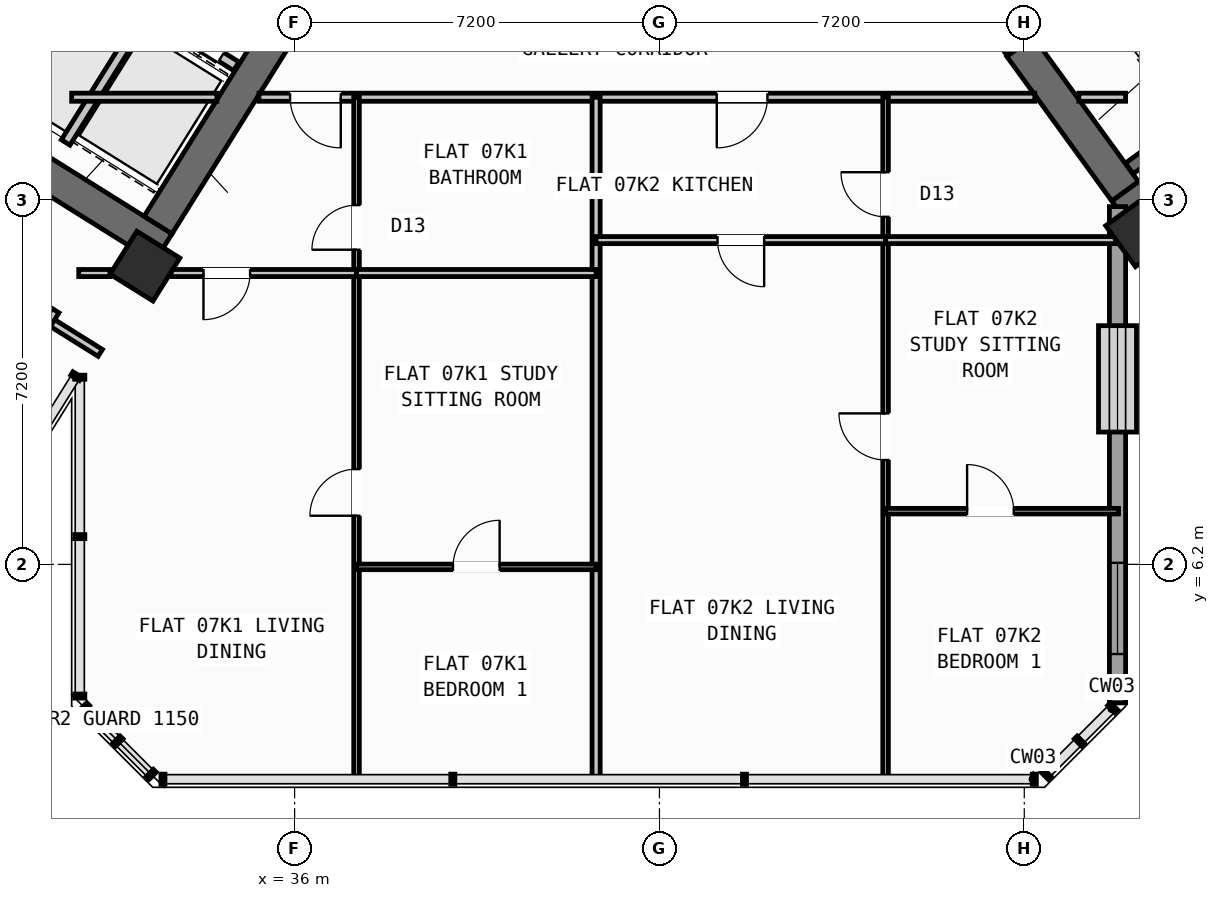
"""IFC4 building model, lengths in metres.
Left out: names, types, materials, properties, quantities, classifications, styles, units other than length and angle.
Written with IfcOpenShell. Run it as: python <this file> out.ifc"""

import sys

from ifc_helpers import new_model, si_unit, direction, frame, frame_2d, origin, origin_2d, place, context, subcontext, project, spatial, rectangle, hollow_rectangle, extrude, source, transform, mapped, element, fill, save


model = new_model("IFC4")
c1 = context("Model", 3, precision=1e-05, world=origin(), true_north=direction((0.0, 1.0)))
c2 = subcontext(c1, "Body", "Model", "MODEL_VIEW")
j1 = project(units=[si_unit("LENGTHUNIT", "METRE"), si_unit("PLANEANGLEUNIT", "RADIAN")], contexts=[c1])
p1 = place(None, origin())
s1 = spatial("IfcSite", under=j1, at=p1, CompositionType="ELEMENT")
p2 = place(p1, origin())
s2 = spatial("IfcBuilding", under=s1, at=p2, CompositionType="ELEMENT")
p3 = place(p2, frame((0.0, 0.0, 31.2)))
s3 = spatial("IfcBuildingStorey", under=s2, at=p3, CompositionType="ELEMENT", Elevation=31.2)
p4 = place(p3, frame((33.409, 12.45, 0.0), z_axis=(0.0, 0.0, 1.0), x_axis=(-0.848051132073, 0.529914405721, 0.0)))
e1 = element("IfcWall", 1, at=p4, inside=s3, PredefinedType="SHEAR", context=c2, shape_type="SweptSolid", body=[
    extrude(rectangle(XDim=13.24, YDim=0.65, at=frame_2d((6.62, 0.0))), origin(), (0.0, 0.0, 1.0), 3.35),
])
p5 = place(p3, frame((36.683, 18.304, 0.0), z_axis=(0.0, 0.0, 1.0), x_axis=(-0.529899109053, -0.848060690178, 0.0)))
e2 = element("IfcWall", 2, at=p5, inside=s3, PredefinedType="SHEAR", context=c2, shape_type="SweptSolid", body=[
    extrude(rectangle(XDim=6.375, YDim=0.65, at=frame_2d((3.188, 0.0))), origin(), (0.0, 0.0, 1.0), 3.35),
])
p6 = place(p3, frame((52.318, 13.11, 0.0), z_axis=(0.0, 0.0, 1.0), x_axis=(0.809019445368, 0.587781878776, 0.0)))
e3 = element("IfcWall", 3, at=p6, inside=s3, PredefinedType="SHEAR", context=c2, shape_type="SweptSolid", body=[
    extrude(rectangle(XDim=12.44, YDim=0.65, at=frame_2d((6.22, 0.0))), origin(), (0.0, 0.0, 1.0), 3.35),
])
p7 = place(p3, frame((52.39, 13.564, 0.0), z_axis=(0.0, 0.0, 1.0), x_axis=(-0.58779688989, 0.809008539037, 0.0)))
e4 = element("IfcWall", 4, at=p7, inside=s3, PredefinedType="SHEAR", context=c2, shape_type="SweptSolid", body=[
    extrude(rectangle(XDim=3.525, YDim=0.65, at=frame_2d((1.763, 0.0))), origin(), (0.0, 0.0, 1.0), 3.35),
])
m1 = source(origin(), c2, "Body", "SweptSolid", [
    extrude(hollow_rectangle(XDim=1.0, YDim=1.0, WallThickness=0.04, at=origin_2d()), origin(), (0.0, 0.0, 1.0), 3.6),
])
for number, where, z_axis, x_axis in (
    (5, (33.046, 12.087, 0.0), (0.0, 0.0, 1.0), (-0.848, 0.53, 0.0)),
    (6, (52.705, 12.773, 0.0), (0.0, 0.0, 1.0), (0.809, 0.588, 0.0)),
):
    element("IfcColumn", number, at=place(p3, frame(where, z_axis=z_axis, x_axis=x_axis)), inside=s3, PredefinedType="COLUMN", context=c2, shape_type="MappedRepresentation", body=[
        mapped(m1, transform((0.0, 0.0, 0.0), scale=1.0)),
    ])
p8 = place(p3, frame((56.581, 7.439, 0.0), z_axis=(0.0, 0.0, 1.0), x_axis=(-0.587785875463, 0.809016541614, 0.0)))
e7 = element("IfcWall", 7, at=p8, inside=s3, PredefinedType="STANDARD", context=c2, shape_type="SweptSolid", body=[
    extrude(rectangle(XDim=6.774, YDim=0.32, at=frame_2d((3.387, 0.0))), origin(), (0.0, 0.0, 1.0), 2.725),
])
p9 = place(p8, frame((1.556, 0.0, 0.8)))
e8 = element("IfcOpeningElement", 8, at=p9, cuts=e7, PredefinedType="OPENING", context=c2, shape_type="SweptSolid", body=[
    extrude(rectangle(XDim=2.1, YDim=1.55, at=frame_2d((1.05, 0.775))), frame((0.0, 0.17, 0.0), z_axis=(0.0, -1.0, 0.0), x_axis=(1.0, 0.0, 0.0)), (0.0, 0.0, 1.0), 0.34),
])
p10 = place(p3, frame((52.24, 13.261, 0.0), z_axis=(0.0, 0.0, 1.0), x_axis=(0.0, -1.0, 0.0)))
e9 = element("IfcWall", 9, at=p10, inside=s3, PredefinedType="STANDARD", context=c2, shape_type="SweptSolid", body=[
    extrude(rectangle(XDim=9.795, YDim=0.32, at=frame_2d((4.897, 0.0))), origin(), (0.0, 0.0, 1.0), 3.35),
])
p11 = place(p10, frame((2.349, 0.0, 0.8)))
e10 = element("IfcOpeningElement", 10, at=p11, cuts=e9, PredefinedType="OPENING", context=c2, shape_type="SweptSolid", body=[
    extrude(rectangle(XDim=2.1, YDim=1.55, at=frame_2d((1.05, 0.775))), frame((0.0, 0.17, 0.0), z_axis=(0.0, -1.0, 0.0), x_axis=(1.0, 0.0, 0.0)), (0.0, 0.0, 1.0), 0.34),
])
p12 = place(p10, frame((7.03, 0.0, 0.85)))
e11 = element("IfcOpeningElement", 11, at=p12, cuts=e9, PredefinedType="OPENING", context=c2, shape_type="SweptSolid", body=[
    extrude(rectangle(XDim=1.8, YDim=1.5, at=frame_2d((0.9, 0.75))), frame((0.0, 0.17, 0.0), z_axis=(0.0, -1.0, 0.0), x_axis=(1.0, 0.0, 0.0)), (0.0, 0.0, 1.0), 0.34),
])
p13 = place(p3, frame((31.288, 18.256, 0.0), z_axis=(0.0, 0.0, 1.0), x_axis=(-0.529943379326, -0.848033026897, 0.0)))
e12 = element("IfcWall", 12, at=p13, inside=s3, PredefinedType="SHEAR", context=c2, shape_type="SweptSolid", body=[
    extrude(rectangle(XDim=3.16, YDim=0.26, at=frame_2d((1.58, 0.0))), origin(), (0.0, 0.0, 1.0), 3.35),
])
p14 = place(p3, frame((34.848, 16.031, 0.0), z_axis=(0.0, 0.0, 1.0), x_axis=(-0.848044042236, 0.529925751807, 0.0)))
e13 = element("IfcWall", 13, at=p14, inside=s3, PredefinedType="STANDARD", context=c2, shape_type="SweptSolid", body=[
    extrude(rectangle(XDim=4.198, YDim=0.2, at=frame_2d((2.099, 0.0))), origin(), (0.0, 0.0, 1.0), 3.34),
])
p15 = place(p14, frame((0.348, 0.0, 0.0)))
e14 = element("IfcOpeningElement", 14, at=p15, cuts=e13, PredefinedType="OPENING", context=c2, shape_type="SweptSolid", body=[
    extrude(rectangle(XDim=1.3, YDim=2.2, at=frame_2d((0.65, 1.1))), frame((0.0, 0.11, 0.0), z_axis=(0.0, -1.0, 0.0), x_axis=(1.0, 0.0, 0.0)), (0.0, 0.0, 1.0), 0.22),
])
p16 = place(p14, frame((2.423, 0.0, 0.0)))
e15 = element("IfcOpeningElement", 15, at=p16, cuts=e13, PredefinedType="OPENING", context=c2, shape_type="SweptSolid", body=[
    extrude(rectangle(XDim=1.45, YDim=2.25, at=frame_2d((0.725, 1.125))), frame((0.0, 0.11, 0.0), z_axis=(0.0, -1.0, 0.0), x_axis=(1.0, 0.0, 0.0)), (0.0, 0.0, 1.0), 0.22),
])
p17 = place(p3, frame((33.029, 17.003, 0.0), z_axis=(0.0, 0.0, 1.0), x_axis=(-0.529916267533, -0.848049968695, 0.0)))
e16 = element("IfcWall", 16, at=p17, inside=s3, PredefinedType="STANDARD", context=c2, shape_type="SweptSolid", body=[
    extrude(rectangle(XDim=2.92, YDim=0.2, at=frame_2d((1.46, 0.0))), origin(), (0.0, 0.0, 1.0), 3.34),
])
p18 = place(p3, frame((52.472, 14.013, 0.0), z_axis=(0.0, 0.0, 1.0), x_axis=(0.809028366311, 0.587769599847, 0.0)))
e17 = element("IfcWall", 17, at=p18, inside=s3, PredefinedType="SHEAR", context=c2, shape_type="SweptSolid", body=[
    extrude(rectangle(XDim=7.33, YDim=0.26, at=frame_2d((3.665, 0.0))), origin(), (0.0, 0.0, 1.0), 3.35),
])
p19 = place(p3, frame((32.164, 10.374, 0.0), z_axis=(0.0, 0.0, 1.0), x_axis=(-0.848044107957, 0.529925646633, 0.0)))
e18 = element("IfcWall", 18, at=p19, inside=s3, PredefinedType="PARTITIONING", context=c2, shape_type="SweptSolid", body=[
    extrude(rectangle(XDim=15.57, YDim=0.16, at=frame_2d((7.785, 0.0))), origin(), (0.0, 0.0, 1.0), 3.34),
])
p20 = place(p19, frame((10.83, 0.0, 0.0)))
e19 = element("IfcOpeningElement", 19, at=p20, cuts=e18, PredefinedType="OPENING", context=c2, shape_type="SweptSolid", body=[
    extrude(rectangle(XDim=1.0, YDim=2.1, at=frame_2d((0.5, 1.05))), frame((0.0, 0.09, 0.0), z_axis=(0.0, -1.0, 0.0), x_axis=(1.0, 0.0, 0.0)), (0.0, 0.0, 1.0), 0.18),
])
p21 = place(p3, frame((31.282, 11.208, 0.0), z_axis=(0.0, 0.0, 1.0), x_axis=(-0.529938869374, -0.84803584519, 0.0)))
e20 = element("IfcWall", 20, at=p21, inside=s3, PredefinedType="PARTITIONING", context=c2, shape_type="SweptSolid", body=[
    extrude(rectangle(XDim=5.48, YDim=0.16, at=frame_2d((2.74, 0.0))), origin(), (0.0, 0.0, 1.0), 3.34),
])
p22 = place(p3, frame((31.6, 15.42, 0.0), z_axis=(0.0, 0.0, 1.0), x_axis=(1.0, 0.0, 0.0)))
e21 = element("IfcWall", 21, at=p22, inside=s3, PredefinedType="PARTITIONING", context=c2, shape_type="SweptSolid", body=[
    extrude(rectangle(XDim=2.866, YDim=0.16, at=frame_2d((1.433, 0.0))), origin(), (0.0, 0.0, 1.0), 3.34),
])
p23 = place(p3, frame((35.296, 15.42, 0.0), z_axis=(0.0, 0.0, 1.0), x_axis=(1.0, 0.0, 0.0)))
e22 = element("IfcWall", 22, at=p23, inside=s3, PredefinedType="PARTITIONING", context=c2, shape_type="SweptSolid", body=[
    extrude(rectangle(XDim=15.311, YDim=0.16, at=frame_2d((7.655, 0.0))), origin(), (0.0, 0.0, 1.0), 3.34),
])
p24 = place(p23, frame((0.615, 0.0, 0.0)))
e23 = element("IfcOpeningElement", 23, at=p24, cuts=e22, PredefinedType="OPENING", context=c2, shape_type="SweptSolid", body=[
    extrude(rectangle(XDim=1.0, YDim=2.1, at=frame_2d((0.5, 1.05))), frame((0.0, 0.09, 0.0), z_axis=(0.0, -1.0, 0.0), x_axis=(1.0, 0.0, 0.0)), (0.0, 0.0, 1.0), 0.18),
])
p25 = place(p23, frame((9.035, 0.0, 0.0)))
e24 = element("IfcOpeningElement", 24, at=p25, cuts=e22, PredefinedType="OPENING", context=c2, shape_type="SweptSolid", body=[
    extrude(rectangle(XDim=1.0, YDim=2.1, at=frame_2d((0.5, 1.05))), frame((0.0, 0.09, 0.0), z_axis=(0.0, -1.0, 0.0), x_axis=(1.0, 0.0, 0.0)), (0.0, 0.0, 1.0), 0.18),
])
p26 = place(p3, frame((51.477, 15.42, 0.0), z_axis=(0.0, 0.0, 1.0), x_axis=(1.0, 0.0, 0.0)))
e25 = element("IfcWall", 25, at=p26, inside=s3, PredefinedType="PARTITIONING", context=c2, shape_type="SweptSolid", body=[
    extrude(rectangle(XDim=0.923, YDim=0.16, at=frame_2d((0.461, 0.0))), origin(), (0.0, 0.0, 1.0), 3.34),
])
p27 = place(p3, frame((50.119, 16.333, 0.0), z_axis=(0.0, 0.0, 1.0), x_axis=(-0.587749856981, 0.809042709391, 0.0)))
e26 = element("IfcWall", 26, at=p27, inside=s3, PredefinedType="STANDARD", context=c2, shape_type="SweptSolid", body=[
    extrude(rectangle(XDim=2.96, YDim=0.2, at=frame_2d((1.48, 0.0))), origin(), (0.0, 0.0, 1.0), 3.34),
])
p28 = place(p27, frame((0.53, 0.0, 0.0)))
e27 = element("IfcOpeningElement", 27, at=p28, cuts=e26, PredefinedType="OPENING", context=c2, shape_type="SweptSolid", body=[
    extrude(rectangle(XDim=1.5, YDim=2.15, at=frame_2d((0.75, 1.075))), frame((0.0, 0.11, 0.0), z_axis=(0.0, -1.0, 0.0), x_axis=(1.0, 0.0, 0.0)), (0.0, 0.0, 1.0), 0.22),
])
p29 = place(p3, frame((41.95, 1.96, 0.0), z_axis=(0.0, 0.0, 1.0), x_axis=(0.0, 1.0, 0.0)))
e28 = element("IfcWall", 28, at=p29, inside=s3, PredefinedType="PARTITIONING", context=c2, shape_type="SweptSolid", body=[
    extrude(rectangle(XDim=13.46, YDim=0.16, at=frame_2d((6.73, 0.0))), origin(), (0.0, 0.0, 1.0), 3.34),
])
p30 = place(p3, frame((37.222, 1.96, 0.0), z_axis=(0.0, 0.0, 1.0), x_axis=(0.0, 1.0, 0.0)))
e29 = element("IfcWall", 29, at=p30, inside=s3, PredefinedType="PARTITIONING", context=c2, shape_type="SweptSolid", body=[
    extrude(rectangle(XDim=13.46, YDim=0.11, at=frame_2d((6.73, 0.0))), origin(), (0.0, 0.0, 1.0), 3.34),
])
p31 = place(p30, frame((5.2, 0.0, 0.0)))
e30 = element("IfcOpeningElement", 30, at=p31, cuts=e29, PredefinedType="OPENING", context=c2, shape_type="SweptSolid", body=[
    extrude(rectangle(XDim=0.92, YDim=2.08, at=frame_2d((0.46, 1.04))), frame((0.0, 0.065, 0.0), z_axis=(0.0, -1.0, 0.0), x_axis=(1.0, 0.0, 0.0)), (0.0, 0.0, 1.0), 0.13),
])
p32 = place(p30, frame((10.45, 0.0, 0.0)))
e31 = element("IfcOpeningElement", 31, at=p32, cuts=e29, PredefinedType="OPENING", context=c2, shape_type="SweptSolid", body=[
    extrude(rectangle(XDim=0.88, YDim=2.08, at=frame_2d((0.44, 1.04))), frame((0.0, 0.065, 0.0), z_axis=(0.0, -1.0, 0.0), x_axis=(1.0, 0.0, 0.0)), (0.0, 0.0, 1.0), 0.13),
])
p33 = place(p3, frame((31.74, 11.95, 0.0), z_axis=(0.0, 0.0, 1.0), x_axis=(1.0, 0.0, 0.0)))
e32 = element("IfcWall", 32, at=p33, inside=s3, PredefinedType="PLUMBINGWALL", context=c2, shape_type="SweptSolid", body=[
    extrude(rectangle(XDim=0.617, YDim=0.14, at=frame_2d((0.309, 0.0))), origin(), (0.0, 0.0, 1.0), 3.34),
])
p34 = place(p3, frame((33.564, 11.95, 0.0), z_axis=(0.0, 0.0, 1.0), x_axis=(1.0, 0.0, 0.0)))
e33 = element("IfcWall", 33, at=p34, inside=s3, PredefinedType="PLUMBINGWALL", context=c2, shape_type="SweptSolid", body=[
    extrude(rectangle(XDim=3.657, YDim=0.14, at=frame_2d((1.829, 0.0))), origin(), (0.0, 0.0, 1.0), 2.525),
])
p35 = place(p34, frame((0.637, 0.0, 0.0)))
e34 = element("IfcOpeningElement", 34, at=p35, cuts=e33, PredefinedType="OPENING", context=c2, shape_type="SweptSolid", body=[
    extrude(rectangle(XDim=0.92, YDim=2.08, at=frame_2d((0.46, 1.04))), frame((0.0, 0.08, 0.0), z_axis=(0.0, -1.0, 0.0), x_axis=(1.0, 0.0, 0.0)), (0.0, 0.0, 1.0), 0.16),
])
p36 = place(p3, frame((37.222, 11.95, 0.0), z_axis=(0.0, 0.0, 1.0), x_axis=(1.0, 0.0, 0.0)))
e35 = element("IfcWall", 35, at=p36, inside=s3, PredefinedType="PLUMBINGWALL", context=c2, shape_type="SweptSolid", body=[
    extrude(rectangle(XDim=4.728, YDim=0.14, at=frame_2d((2.364, 0.0))), origin(), (0.0, 0.0, 1.0), 2.525),
])
p37 = place(p3, frame((37.222, 6.15, 0.0), z_axis=(0.0, 0.0, 1.0), x_axis=(1.0, 0.0, 0.0)))
e36 = element("IfcWall", 36, at=p37, inside=s3, PredefinedType="PARTITIONING", context=c2, shape_type="SweptSolid", body=[
    extrude(rectangle(XDim=4.728, YDim=0.11, at=frame_2d((2.364, 0.0))), origin(), (0.0, 0.0, 1.0), 3.34),
])
p38 = place(p37, frame((1.904, 0.0, 0.0)))
e37 = element("IfcOpeningElement", 37, at=p38, cuts=e36, PredefinedType="OPENING", context=c2, shape_type="SweptSolid", body=[
    extrude(rectangle(XDim=0.92, YDim=2.08, at=frame_2d((0.46, 1.04))), frame((0.0, 0.065, 0.0), z_axis=(0.0, -1.0, 0.0), x_axis=(1.0, 0.0, 0.0)), (0.0, 0.0, 1.0), 0.13),
])
p39 = place(p3, frame((47.663, 1.96, 0.0), z_axis=(0.0, 0.0, 1.0), x_axis=(0.0, 1.0, 0.0)))
e38 = element("IfcWall", 38, at=p39, inside=s3, PredefinedType="PARTITIONING", context=c2, shape_type="SweptSolid", body=[
    extrude(rectangle(XDim=13.46, YDim=0.11, at=frame_2d((6.73, 0.0))), origin(), (0.0, 0.0, 1.0), 3.34),
])
p40 = place(p39, frame((6.3, 0.0, 0.0)))
e39 = element("IfcOpeningElement", 39, at=p40, cuts=e38, PredefinedType="OPENING", context=c2, shape_type="SweptSolid", body=[
    extrude(rectangle(XDim=0.92, YDim=2.08, at=frame_2d((0.46, 1.04))), frame((0.0, 0.065, 0.0), z_axis=(0.0, -1.0, 0.0), x_axis=(1.0, 0.0, 0.0)), (0.0, 0.0, 1.0), 0.13),
])
p41 = place(p39, frame((11.1, 0.0, 0.0)))
e40 = element("IfcOpeningElement", 40, at=p41, cuts=e38, PredefinedType="OPENING", context=c2, shape_type="SweptSolid", body=[
    extrude(rectangle(XDim=0.88, YDim=2.08, at=frame_2d((0.44, 1.04))), frame((0.0, 0.065, 0.0), z_axis=(0.0, -1.0, 0.0), x_axis=(1.0, 0.0, 0.0)), (0.0, 0.0, 1.0), 0.13),
])
p42 = place(p3, frame((41.95, 12.6, 0.0), z_axis=(0.0, 0.0, 1.0), x_axis=(1.0, 0.0, 0.0)))
e41 = element("IfcWall", 41, at=p42, inside=s3, PredefinedType="PLUMBINGWALL", context=c2, shape_type="SweptSolid", body=[
    extrude(rectangle(XDim=5.713, YDim=0.14, at=frame_2d((2.856, 0.0))), origin(), (0.0, 0.0, 1.0), 2.525),
])
p43 = place(p42, frame((2.396, 0.0, 0.0)))
e42 = element("IfcOpeningElement", 42, at=p43, cuts=e41, PredefinedType="OPENING", context=c2, shape_type="SweptSolid", body=[
    extrude(rectangle(XDim=0.92, YDim=2.08, at=frame_2d((0.46, 1.04))), frame((0.0, 0.08, 0.0), z_axis=(0.0, -1.0, 0.0), x_axis=(1.0, 0.0, 0.0)), (0.0, 0.0, 1.0), 0.16),
])
p44 = place(p3, frame((47.663, 12.6, 0.0), z_axis=(0.0, 0.0, 1.0), x_axis=(1.0, 0.0, 0.0)))
e43 = element("IfcWall", 43, at=p44, inside=s3, PredefinedType="PLUMBINGWALL", context=c2, shape_type="SweptSolid", body=[
    extrude(rectangle(XDim=4.535, YDim=0.14, at=frame_2d((2.268, 0.0))), origin(), (0.0, 0.0, 1.0), 2.525),
])
p45 = place(p3, frame((47.663, 7.25, 0.0), z_axis=(0.0, 0.0, 1.0), x_axis=(1.0, 0.0, 0.0)))
e44 = element("IfcWall", 44, at=p45, inside=s3, PredefinedType="PARTITIONING", context=c2, shape_type="SweptSolid", body=[
    extrude(rectangle(XDim=4.597, YDim=0.11, at=frame_2d((2.298, 0.0))), origin(), (0.0, 0.0, 1.0), 3.34),
])
p46 = place(p45, frame((1.608, 0.0, 0.0)))
e45 = element("IfcOpeningElement", 45, at=p46, cuts=e44, PredefinedType="OPENING", context=c2, shape_type="SweptSolid", body=[
    extrude(rectangle(XDim=0.92, YDim=2.08, at=frame_2d((0.46, 1.04))), frame((0.0, 0.065, 0.0), z_axis=(0.0, -1.0, 0.0), x_axis=(1.0, 0.0, 0.0)), (0.0, 0.0, 1.0), 0.13),
])
m2 = source(origin(), c2, "Body", "SweptSolid", [
    extrude(rectangle(XDim=2.1, YDim=1.55, at=frame_2d((1.05, 0.775))), frame((0.0, 0.03, 0.0), z_axis=(0.0, -1.0, 0.0), x_axis=(1.0, 0.0, 0.0)), (0.0, 0.0, 1.0), 0.06),
])
p47 = place(p11, origin())
e46 = element("IfcWindow", 46, at=p47, inside=s3, PartitioningType="SINGLE_PANEL", PredefinedType="WINDOW", context=c2, shape_type="MappedRepresentation", body=[
    mapped(m2, transform((0.0, 0.0, 0.0), scale=1.0)),
])
fill(e10, e46)
m3 = source(origin(), c2, "Body", "SweptSolid", [
    extrude(rectangle(XDim=1.8, YDim=1.5, at=frame_2d((0.9, 0.75))), frame((0.0, 0.03, 0.0), z_axis=(0.0, -1.0, 0.0), x_axis=(1.0, 0.0, 0.0)), (0.0, 0.0, 1.0), 0.06),
])
p48 = place(p12, origin())
e47 = element("IfcWindow", 47, at=p48, inside=s3, PartitioningType="SINGLE_PANEL", PredefinedType="WINDOW", context=c2, shape_type="MappedRepresentation", body=[
    mapped(m3, transform((0.0, 0.0, 0.0), scale=1.0)),
])
fill(e11, e47)
m4 = source(origin(), c2, "Body", "SweptSolid", [
    extrude(rectangle(XDim=1.3, YDim=2.2, at=frame_2d((0.65, 1.1))), frame((0.0, 0.025, 0.0), z_axis=(0.0, -1.0, 0.0), x_axis=(1.0, 0.0, 0.0)), (0.0, 0.0, 1.0), 0.05),
])
p49 = place(p15, origin())
e48 = element("IfcDoor", 48, at=p49, inside=s3, OperationType="DOUBLE_DOOR_SLIDING", PredefinedType="DOOR", context=c2, shape_type="MappedRepresentation", body=[
    mapped(m4, transform((0.0, 0.0, 0.0), scale=1.0)),
])
fill(e14, e48)
m5 = source(origin(), c2, "Body", "SweptSolid", [
    extrude(rectangle(XDim=0.92, YDim=2.08, at=frame_2d((0.46, 1.04))), frame((0.0, 0.025, 0.0), z_axis=(0.0, -1.0, 0.0), x_axis=(1.0, 0.0, 0.0)), (0.0, 0.0, 1.0), 0.05),
])
p50 = place(p31, origin())
e49 = element("IfcDoor", 49, at=p50, inside=s3, OperationType="SINGLE_SWING_LEFT", PredefinedType="DOOR", context=c2, shape_type="MappedRepresentation", body=[
    mapped(m5, transform((0.0, 0.0, 0.0), scale=1.0)),
])
fill(e30, e49)
p51 = place(p38, origin())
e50 = element("IfcDoor", 50, at=p51, inside=s3, OperationType="SINGLE_SWING_RIGHT", PredefinedType="DOOR", context=c2, shape_type="MappedRepresentation", body=[
    mapped(m5, transform((0.0, 0.0, 0.0), scale=1.0)),
])
fill(e37, e50)
m6 = source(origin(), c2, "Body", "SweptSolid", [
    extrude(rectangle(XDim=1.0, YDim=2.1, at=frame_2d((0.5, 1.05))), frame((0.0, 0.025, 0.0), z_axis=(0.0, -1.0, 0.0), x_axis=(1.0, 0.0, 0.0)), (0.0, 0.0, 1.0), 0.05),
])
p52 = place(p24, frame((1.0, 0.0, 0.0), z_axis=(0.0, 0.0, 1.0), x_axis=(-1.0, 0.0, 0.0)))
e51 = element("IfcDoor", 51, at=p52, inside=s3, OperationType="SINGLE_SWING_LEFT", PredefinedType="DOOR", context=c2, shape_type="MappedRepresentation", body=[
    mapped(m6, transform((0.0, 0.0, 0.0), scale=1.0)),
])
fill(e23, e51)
p53 = place(p35, frame((0.92, 0.0, 0.0), z_axis=(0.0, 0.0, 1.0), x_axis=(-1.0, 0.0, 0.0)))
e52 = element("IfcDoor", 52, at=p53, inside=s3, OperationType="SINGLE_SWING_RIGHT", PredefinedType="DOOR", context=c2, shape_type="MappedRepresentation", body=[
    mapped(m5, transform((0.0, 0.0, 0.0), scale=1.0)),
])
fill(e34, e52)
m7 = source(origin(), c2, "Body", "SweptSolid", [
    extrude(rectangle(XDim=0.88, YDim=2.08, at=frame_2d((0.44, 1.04))), frame((0.0, 0.025, 0.0), z_axis=(0.0, -1.0, 0.0), x_axis=(1.0, 0.0, 0.0)), (0.0, 0.0, 1.0), 0.05),
])
p54 = place(p32, origin())
e53 = element("IfcDoor", 53, at=p54, inside=s3, OperationType="SINGLE_SWING_LEFT", PredefinedType="DOOR", context=c2, shape_type="MappedRepresentation", body=[
    mapped(m7, transform((0.0, 0.0, 0.0), scale=1.0)),
])
fill(e31, e53)
p55 = place(p40, origin())
e54 = element("IfcDoor", 54, at=p55, inside=s3, OperationType="SINGLE_SWING_RIGHT", PredefinedType="DOOR", context=c2, shape_type="MappedRepresentation", body=[
    mapped(m5, transform((0.0, 0.0, 0.0), scale=1.0)),
])
fill(e39, e54)
p56 = place(p46, origin())
e55 = element("IfcDoor", 55, at=p56, inside=s3, OperationType="SINGLE_SWING_LEFT", PredefinedType="DOOR", context=c2, shape_type="MappedRepresentation", body=[
    mapped(m5, transform((0.0, 0.0, 0.0), scale=1.0)),
])
fill(e45, e55)
p57 = place(p25, frame((1.0, 0.0, 0.0), z_axis=(0.0, 0.0, 1.0), x_axis=(-1.0, 0.0, 0.0)))
e56 = element("IfcDoor", 56, at=p57, inside=s3, OperationType="SINGLE_SWING_RIGHT", PredefinedType="DOOR", context=c2, shape_type="MappedRepresentation", body=[
    mapped(m6, transform((0.0, 0.0, 0.0), scale=1.0)),
])
fill(e24, e56)
p58 = place(p43, frame((0.92, 0.0, 0.0), z_axis=(0.0, 0.0, 1.0), x_axis=(-1.0, 0.0, 0.0)))
e57 = element("IfcDoor", 57, at=p58, inside=s3, OperationType="SINGLE_SWING_LEFT", PredefinedType="DOOR", context=c2, shape_type="MappedRepresentation", body=[
    mapped(m5, transform((0.0, 0.0, 0.0), scale=1.0)),
])
fill(e42, e57)
p59 = place(p41, origin())
e58 = element("IfcDoor", 58, at=p59, inside=s3, OperationType="SINGLE_SWING_RIGHT", PredefinedType="DOOR", context=c2, shape_type="MappedRepresentation", body=[
    mapped(m7, transform((0.0, 0.0, 0.0), scale=1.0)),
])
fill(e40, e58)
save(model, sys.argv[1])
